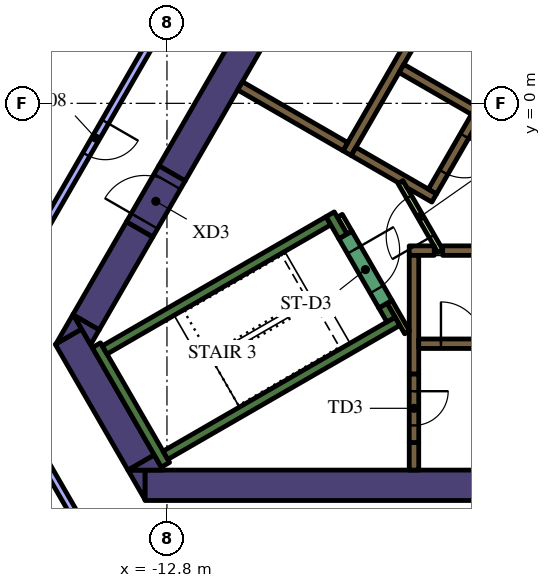
"""IFC4 building model, lengths in metres.
Left out: names, types, materials, properties, quantities, classifications, styles, units other than length and angle.
Written with IfcOpenShell. Run it as: python <this file> out.ifc"""

import sys

from ifc_helpers import new_model, si_unit, direction, frame, frame_2d, origin, place, context, subcontext, project, spatial, polyline, rectangle, outline, extrude, element, fill, save


model = new_model("IFC4")
c1 = context("Model", 3, precision=1e-05, world=origin(), true_north=direction((0.0, 1.0)))
c2 = subcontext(c1, "Body", "Model", "MODEL_VIEW")
j1 = project(units=[si_unit("LENGTHUNIT", "METRE"), si_unit("PLANEANGLEUNIT", "RADIAN")], contexts=[c1])
p1 = place(None, origin())
s1 = spatial("IfcSite", under=j1, at=p1, CompositionType="ELEMENT")
p2 = place(p1, origin())
s2 = spatial("IfcBuilding", under=s1, at=p2, CompositionType="ELEMENT")
p3 = place(p2, frame((0.0, 0.0, 183.6)))
s3 = spatial("IfcBuildingStorey", under=s2, at=p3, CompositionType="ELEMENT", Elevation=183.6)
p4 = place(p3, frame((-13.378, -10.05, 0.0), z_axis=(0.0, 0.0, 1.0), x_axis=(1.0, 0.0, 0.0)))
e1 = element("IfcWall", 1, at=p4, inside=s3, PredefinedType="SOLIDWALL", context=c2, shape_type="SweptSolid", body=[
    extrude(rectangle(XDim=22.282, YDim=0.8, at=frame_2d((11.141, 0.0))), origin(), (0.0, 0.0, 1.0), 4.2),
])
p5 = place(p3, origin())
e2 = element("IfcWall", 2, at=p5, inside=s3, PredefinedType="SOLIDWALL", context=c2, shape_type="SweptSolid", body=[
    extrude(outline(polyline([(-13.828, -9.65), (-13.38, -9.65), (-13.38, -10.426), (-13.828, -9.65)])), origin(), (0.0, 0.0, 1.0), 4.2),
])
p6 = place(p3, frame((-15.392, -6.14, 0.0), z_axis=(0.0, 0.0, 1.0), x_axis=(0.499984020225, -0.866034629516, 0.0)))
e3 = element("IfcWall", 3, at=p6, inside=s3, PredefinedType="SOLIDWALL", context=c2, shape_type="SweptSolid", body=[
    extrude(rectangle(XDim=3.824, YDim=0.8, at=frame_2d((1.912, 0.0))), origin(), (0.0, 0.0, 1.0), 4.2),
])
e4 = element("IfcWall", 4, at=p5, inside=s3, PredefinedType="SOLIDWALL", context=c2, shape_type="SweptSolid", body=[
    extrude(outline(polyline([(-15.047, -5.938), (-15.719, -6.326), (-15.271, -5.55), (-15.047, -5.938)])), origin(), (0.0, 0.0, 1.0), 4.2),
])
e5 = element("IfcWall", 5, at=p5, inside=s3, PredefinedType="SOLIDWALL", context=c2, shape_type="SweptSolid", body=[
    extrude(outline(polyline([(-12.904, -9.65), (-13.82, -9.65), (-13.133, -9.253), (-12.904, -9.65)])), origin(), (0.0, 0.0, 1.0), 4.2),
])
p7 = place(p3, frame((-13.518, -3.314, 0.0), z_axis=(0.0, 0.0, 1.0), x_axis=(-0.499969377405, -0.866043083026, 0.0)))
e6 = element("IfcWall", 6, at=p7, inside=s3, PredefinedType="SOLIDWALL", context=c2, shape_type="SweptSolid", body=[
    extrude(rectangle(XDim=2.824, YDim=0.8, at=frame_2d((1.412, 0.0))), origin(), (0.0, 0.0, 1.0), 4.2),
])
e7 = element("IfcWall", 7, at=p5, inside=s3, PredefinedType="SOLIDWALL", context=c2, shape_type="SweptSolid", body=[
    extrude(outline(polyline([(-14.809, -6.35), (-15.257, -5.574), (-14.585, -5.962), (-14.809, -6.35)])), origin(), (0.0, 0.0, 1.0), 4.2),
])
p8 = place(p3, frame((-12.668, -1.842, 0.0), z_axis=(0.0, 0.0, 1.0), x_axis=(0.500003640647, 0.866023301845, 0.0)))
e8 = element("IfcWall", 8, at=p8, inside=s3, PredefinedType="SOLIDWALL", context=c2, shape_type="SweptSolid", body=[
    extrude(rectangle(XDim=15.858, YDim=0.8, at=frame_2d((7.929, 0.0))), origin(), (0.0, 0.0, 1.0), 4.2),
])
p9 = place(p3, frame((-12.84, -9.511, 0.0), z_axis=(0.0, 0.0, 1.0), x_axis=(-0.499997733992, 0.866026712061, 0.0)))
e9 = element("IfcWall", 9, at=p9, inside=s3, PredefinedType="SOLIDWALL", context=c2, shape_type="SweptSolid", body=[
    extrude(rectangle(XDim=3.634, YDim=0.25, at=frame_2d((1.817, 0.0))), origin(), (0.0, 0.0, 1.0), 4.2),
])
p10 = place(p3, frame((-14.44, -6.49, 0.0), z_axis=(0.0, 0.0, 1.0), x_axis=(0.866022966069, 0.500004222222, 0.0)))
e10 = element("IfcWall", 10, at=p10, inside=s3, PredefinedType="SOLIDWALL", context=c2, shape_type="SweptSolid", body=[
    extrude(rectangle(XDim=6.8, YDim=0.25, at=frame_2d((3.4, 0.0))), origin(), (0.0, 0.0, 1.0), 4.2),
])
p11 = place(p3, frame((-8.168, -3.503, 0.0), z_axis=(0.0, 0.0, 1.0), x_axis=(-0.499952099219, 0.866053057547, 0.0)))
e11 = element("IfcWall", 11, at=p11, inside=s3, PredefinedType="SOLIDWALL", context=c2, shape_type="SweptSolid", body=[
    extrude(rectangle(XDim=0.675, YDim=0.25, at=frame_2d((0.337, 0.0))), origin(), (0.0, 0.0, 1.0), 4.2),
])
p12 = place(p3, frame((-12.84, -9.261, 0.0), z_axis=(0.0, 0.0, 1.0), x_axis=(0.866016039709, 0.500016218704, 0.0)))
e12 = element("IfcWall", 12, at=p12, inside=s3, PredefinedType="SOLIDWALL", context=c2, shape_type="SweptSolid", body=[
    extrude(rectangle(XDim=7.05, YDim=0.25, at=frame_2d((3.525, 0.0))), origin(), (0.0, 0.0, 1.0), 4.2),
])
p13 = place(p3, frame((-6.905, -5.69, 0.0), z_axis=(0.0, 0.0, 1.0), x_axis=(-0.500402024738, 0.865793170242, 0.0)))
e13 = element("IfcWall", 13, at=p13, inside=s3, PredefinedType="SOLIDWALL", context=c2, shape_type="SweptSolid", body=[
    extrude(rectangle(XDim=0.425, YDim=0.25, at=frame_2d((0.212, 0.0))), origin(), (0.0, 0.0, 1.0), 4.2),
])
p14 = place(p3, frame((-6.3, -8.925, 0.0), z_axis=(0.0, 0.0, 1.0), x_axis=(0.0, -1.0, 0.0)))
e14 = element("IfcWall", 14, at=p14, inside=s3, PredefinedType="SOLIDWALL", context=c2, shape_type="SweptSolid", body=[
    extrude(rectangle(XDim=0.725, YDim=0.25, at=frame_2d((0.363, 0.0))), origin(), (0.0, 0.0, 1.0), 4.2),
])
p15 = place(p3, frame((-5.545, -3.875, 0.0), z_axis=(0.0, 0.0, 1.0), x_axis=(1.0, 0.0, 0.0)))
e15 = element("IfcWall", 15, at=p15, inside=s3, PredefinedType="SOLIDWALL", context=c2, shape_type="SweptSolid", body=[
    extrude(rectangle(XDim=11.97, YDim=0.25, at=frame_2d((5.985, 0.0))), origin(), (0.0, 0.0, 1.0), 4.2),
])
p16 = place(p3, frame((-6.425, -3.875, 0.0), z_axis=(0.0, 0.0, 1.0), x_axis=(1.0, 0.0, 0.0)))
e16 = element("IfcWall", 16, at=p16, inside=s3, PredefinedType="SOLIDWALL", context=c2, shape_type="SweptSolid", body=[
    extrude(rectangle(XDim=0.658, YDim=0.25, at=frame_2d((0.329, 0.0))), origin(), (0.0, 0.0, 1.0), 4.2),
])
p17 = place(p3, frame((-6.3, -7.125, 0.0), z_axis=(0.0, 0.0, 1.0), x_axis=(0.0, 1.0, 0.0)))
e17 = element("IfcWall", 17, at=p17, inside=s3, PredefinedType="SOLIDWALL", context=c2, shape_type="SweptSolid", body=[
    extrude(rectangle(XDim=3.125, YDim=0.25, at=frame_2d((1.562, 0.0))), origin(), (0.0, 0.0, 1.0), 4.2),
])
p18 = place(p3, frame((-8.06, -1.311, 0.0), z_axis=(0.0, 0.0, 1.0), x_axis=(0.50000273126, 0.866023826885, 0.0)))
e18 = element("IfcWall", 18, at=p18, inside=s3, PredefinedType="SOLIDWALL", context=c2, shape_type="SweptSolid", body=[
    extrude(rectangle(XDim=10.33, YDim=0.25, at=frame_2d((5.165, 0.0))), origin(), (0.0, 0.0, 1.0), 4.2),
])
p19 = place(p3, frame((-4.724, -0.182, 0.0), z_axis=(0.0, 0.0, 1.0), x_axis=(-0.866008176907, 0.50002983664, 0.0)))
e19 = element("IfcWall", 19, at=p19, inside=s3, PredefinedType="SOLIDWALL", context=c2, shape_type="SweptSolid", body=[
    extrude(rectangle(XDim=2.2, YDim=0.25, at=frame_2d((1.1, 0.0))), origin(), (0.0, 0.0, 1.0), 4.2),
])
e20 = element("IfcWall", 20, at=p5, inside=s3, PredefinedType="SOLIDWALL", context=c2, shape_type="SweptSolid", body=[
    extrude(outline(polyline([(-5.922, -2.257), (-5.922, -2.257), (-5.705, -2.382), (-5.83, -2.598), (-6.483, -2.221), (-6.591, -2.033), (-6.591, -2.033), (-6.7, -2.096), (-7.952, -1.373), (-7.827, -1.156), (-5.922, -2.257)])), origin(), (0.0, 0.0, 1.0), 4.2),
])
p20 = place(p3, frame((-8.106, -1.14, 0.0), z_axis=(0.0, 0.0, 1.0), x_axis=(-0.866008981251, 0.500028443584, 0.0)))
e21 = element("IfcWall", 21, at=p20, inside=s3, PredefinedType="SOLIDWALL", context=c2, shape_type="SweptSolid", body=[
    extrude(rectangle(XDim=3.2, YDim=0.25, at=frame_2d((1.6, 0.0))), origin(), (0.0, 0.0, 1.0), 4.2),
])
p21 = place(p3, frame((-8.252, -2.958, 0.0), z_axis=(0.0, 0.0, 1.0), x_axis=(0.500174715838, -0.865924508047, 0.0)))
e22 = element("IfcWall", 22, at=p21, inside=s3, PredefinedType="PARTITIONING", context=c2, shape_type="SweptSolid", body=[
    extrude(rectangle(XDim=0.514, YDim=0.15, at=frame_2d((0.257, 0.0))), origin(), (0.0, 0.0, 1.0), 3.15),
])
p22 = place(p3, frame((-6.48, -6.027, 0.0), z_axis=(0.0, 0.0, 1.0), x_axis=(-0.499927229454, 0.866067413802, 0.0)))
e23 = element("IfcWall", 23, at=p22, inside=s3, PredefinedType="PARTITIONING", context=c2, shape_type="SweptSolid", body=[
    extrude(rectangle(XDim=0.929, YDim=0.15, at=frame_2d((0.464, 0.0))), origin(), (0.0, 0.0, 1.0), 4.2),
])
p23 = place(p3, frame((-6.175, -6.325, 0.0), z_axis=(0.0, 0.0, 1.0), x_axis=(1.0, 0.0, 0.0)))
e24 = element("IfcWall", 24, at=p23, inside=s3, PredefinedType="SOLIDWALL", context=c2, shape_type="SweptSolid", body=[
    extrude(rectangle(XDim=12.35, YDim=0.25, at=frame_2d((6.175, 0.0))), origin(), (0.0, 0.0, 1.0), 4.2),
])
p24 = place(p23, frame((0.585, 0.0, 0.0)))
e25 = element("IfcOpeningElement", 25, at=p24, cuts=e24, PredefinedType="OPENING", context=c2, shape_type="SweptSolid", body=[
    extrude(rectangle(XDim=1.1, YDim=2.1, at=frame_2d((0.55, 1.05))), frame((0.0, 0.135, 0.0), z_axis=(0.0, -1.0, 0.0), x_axis=(1.0, 0.0, 0.0)), (0.0, 0.0, 1.0), 0.27),
])
p25 = place(p23, frame((3.105, 0.0, 0.0)))
e26 = element("IfcOpeningElement", 26, at=p25, cuts=e24, PredefinedType="OPENING", context=c2, shape_type="SweptSolid", body=[
    extrude(rectangle(XDim=1.1, YDim=2.1, at=frame_2d((0.55, 1.05))), frame((0.0, 0.135, 0.0), z_axis=(0.0, -1.0, 0.0), x_axis=(1.0, 0.0, 0.0)), (0.0, 0.0, 1.0), 0.27),
])
p26 = place(p23, frame((5.625, 0.0, 0.0)))
e27 = element("IfcOpeningElement", 27, at=p26, cuts=e24, PredefinedType="OPENING", context=c2, shape_type="SweptSolid", body=[
    extrude(rectangle(XDim=1.1, YDim=2.1, at=frame_2d((0.55, 1.05))), frame((0.0, 0.135, 0.0), z_axis=(0.0, -1.0, 0.0), x_axis=(1.0, 0.0, 0.0)), (0.0, 0.0, 1.0), 0.27),
])
p27 = place(p23, frame((8.145, 0.0, 0.0)))
e28 = element("IfcOpeningElement", 28, at=p27, cuts=e24, PredefinedType="OPENING", context=c2, shape_type="SweptSolid", body=[
    extrude(rectangle(XDim=1.1, YDim=2.1, at=frame_2d((0.55, 1.05))), frame((0.0, 0.135, 0.0), z_axis=(0.0, -1.0, 0.0), x_axis=(1.0, 0.0, 0.0)), (0.0, 0.0, 1.0), 0.27),
])
p28 = place(p23, frame((10.665, 0.0, 0.0)))
e29 = element("IfcOpeningElement", 29, at=p28, cuts=e24, PredefinedType="OPENING", context=c2, shape_type="SweptSolid", body=[
    extrude(rectangle(XDim=1.1, YDim=2.1, at=frame_2d((0.55, 1.05))), frame((0.0, 0.135, 0.0), z_axis=(0.0, -1.0, 0.0), x_axis=(1.0, 0.0, 0.0)), (0.0, 0.0, 1.0), 0.27),
])
p29 = place(p3, frame((-0.898, 6.194, 0.0), z_axis=(0.0, 0.0, 1.0), x_axis=(-0.499996202215, -0.866027596426, 0.0)))
e30 = element("IfcWall", 30, at=p29, inside=s3, PredefinedType="SOLIDWALL", context=c2, shape_type="SweptSolid", body=[
    extrude(rectangle(XDim=9.83, YDim=0.25, at=frame_2d((4.915, 0.0))), origin(), (0.0, 0.0, 1.0), 4.2),
])
p30 = place(p29, frame((0.585, 0.0, 0.0)))
e31 = element("IfcOpeningElement", 31, at=p30, cuts=e30, PredefinedType="OPENING", context=c2, shape_type="SweptSolid", body=[
    extrude(rectangle(XDim=1.1, YDim=2.1, at=frame_2d((0.55, 1.05))), frame((0.0, 0.135, 0.0), z_axis=(0.0, -1.0, 0.0), x_axis=(1.0, 0.0, 0.0)), (0.0, 0.0, 1.0), 0.27),
])
p31 = place(p29, frame((3.105, 0.0, 0.0)))
e32 = element("IfcOpeningElement", 32, at=p31, cuts=e30, PredefinedType="OPENING", context=c2, shape_type="SweptSolid", body=[
    extrude(rectangle(XDim=1.1, YDim=2.1, at=frame_2d((0.55, 1.05))), frame((0.0, 0.135, 0.0), z_axis=(0.0, -1.0, 0.0), x_axis=(1.0, 0.0, 0.0)), (0.0, 0.0, 1.0), 0.27),
])
p32 = place(p29, frame((5.625, 0.0, 0.0)))
e33 = element("IfcOpeningElement", 33, at=p32, cuts=e30, PredefinedType="OPENING", context=c2, shape_type="SweptSolid", body=[
    extrude(rectangle(XDim=1.1, YDim=2.1, at=frame_2d((0.55, 1.05))), frame((0.0, 0.135, 0.0), z_axis=(0.0, -1.0, 0.0), x_axis=(1.0, 0.0, 0.0)), (0.0, 0.0, 1.0), 0.27),
])
p33 = place(p29, frame((8.145, 0.0, 0.0)))
e34 = element("IfcOpeningElement", 34, at=p33, cuts=e30, PredefinedType="OPENING", context=c2, shape_type="SweptSolid", body=[
    extrude(rectangle(XDim=1.1, YDim=2.1, at=frame_2d((0.55, 1.05))), frame((0.0, 0.135, 0.0), z_axis=(0.0, -1.0, 0.0), x_axis=(1.0, 0.0, 0.0)), (0.0, 0.0, 1.0), 0.27),
])
p34 = place(p3, frame((-8.103, -3.466, 0.0), z_axis=(0.0, 0.0, 1.0), x_axis=(0.500078061341, -0.865980330357, 0.0)))
e35 = element("IfcWall", 35, at=p34, inside=s3, PredefinedType="SOLIDWALL", context=c2, shape_type="SweptSolid", body=[
    extrude(rectangle(XDim=2.1, YDim=0.4, at=frame_2d((1.05, 0.0))), origin(), (0.0, 0.0, 1.0), 4.2),
])
p35 = place(p34, frame((0.45, 0.0, 0.0)))
e36 = element("IfcOpeningElement", 36, at=p35, cuts=e35, PredefinedType="OPENING", context=c2, shape_type="SweptSolid", body=[
    extrude(rectangle(XDim=1.2, YDim=2.1, at=frame_2d((0.6, 1.05))), frame((0.0, 0.21, 0.0), z_axis=(0.0, -1.0, 0.0), x_axis=(1.0, 0.0, 0.0)), (0.0, 0.0, 1.0), 0.42),
])
p36 = place(p3, frame((-6.3, -7.125, 0.0), z_axis=(0.0, 0.0, 1.0), x_axis=(0.0, -1.0, 0.0)))
e37 = element("IfcWall", 37, at=p36, inside=s3, PredefinedType="SOLIDWALL", context=c2, shape_type="SweptSolid", body=[
    extrude(rectangle(XDim=1.8, YDim=0.25, at=frame_2d((0.9, 0.0))), origin(), (0.0, 0.0, 1.0), 4.2),
])
p37 = place(p36, frame((0.45, 0.0, 0.0)))
e38 = element("IfcOpeningElement", 38, at=p37, cuts=e37, PredefinedType="OPENING", context=c2, shape_type="SweptSolid", body=[
    extrude(rectangle(XDim=0.9, YDim=2.1, at=frame_2d((0.45, 1.05))), frame((0.0, 0.135, 0.0), z_axis=(0.0, -1.0, 0.0), x_axis=(1.0, 0.0, 0.0)), (0.0, 0.0, 1.0), 0.27),
])
p38 = place(p3, frame((-5.606, -3.89, 0.0), z_axis=(0.0, 0.0, 1.0), x_axis=(-0.500027713859, 0.866009402589, 0.0)))
e39 = element("IfcWall", 39, at=p38, inside=s3, PredefinedType="PARTITIONING", context=c2, shape_type="SweptSolid", body=[
    extrude(rectangle(XDim=2.1, YDim=0.15, at=frame_2d((1.05, 0.0))), origin(), (0.0, 0.0, 1.0), 3.15),
])
p39 = place(p38, frame((0.45, 0.0, 0.0)))
e40 = element("IfcOpeningElement", 40, at=p39, cuts=e39, PredefinedType="OPENING", context=c2, shape_type="SweptSolid", body=[
    extrude(rectangle(XDim=1.2, YDim=2.1, at=frame_2d((0.6, 1.05))), frame((0.0, 0.085, 0.0), z_axis=(0.0, -1.0, 0.0), x_axis=(1.0, 0.0, 0.0)), (0.0, 0.0, 1.0), 0.17),
])
p40 = place(p3, frame((-13.518, -3.314, 0.0), z_axis=(0.0, 0.0, 1.0), x_axis=(0.500000056704, 0.866025371046, 0.0)))
e41 = element("IfcWall", 41, at=p40, inside=s3, PredefinedType="SOLIDWALL", context=c2, shape_type="SweptSolid", body=[
    extrude(rectangle(XDim=1.7, YDim=0.8, at=frame_2d((0.85, 0.0))), origin(), (0.0, 0.0, 1.0), 4.2),
])
p41 = place(p40, frame((0.25, 0.0, 0.0)))
e42 = element("IfcOpeningElement", 42, at=p41, cuts=e41, PredefinedType="OPENING", context=c2, shape_type="SweptSolid", body=[
    extrude(rectangle(XDim=1.2, YDim=2.1, at=frame_2d((0.6, 1.05))), frame((0.0, 0.41, 0.0), z_axis=(0.0, -1.0, 0.0), x_axis=(1.0, 0.0, 0.0)), (0.0, 0.0, 1.0), 0.82),
])
p42 = place(p3, frame((-12.374, 3.068, 0.0), z_axis=(0.0, 0.0, 1.0), x_axis=(-0.50000000053, -0.866025403479, 0.0)))
e43 = element("IfcWall", 43, at=p42, inside=s3, PredefinedType="PARTITIONING", context=c2, shape_type="SweptSolid", body=[
    extrude(rectangle(XDim=9.188, YDim=0.2, at=frame_2d((4.594, 0.0))), origin(), (0.0, 0.0, 1.0), 3.15),
])
p43 = place(p42, frame((4.1, 0.0, 0.0)))
e44 = element("IfcOpeningElement", 44, at=p43, cuts=e43, PredefinedType="OPENING", context=c2, shape_type="SweptSolid", body=[
    extrude(rectangle(XDim=1.0, YDim=2.1, at=frame_2d((0.5, 1.05))), frame((0.0, 0.11, 0.0), z_axis=(0.0, -1.0, 0.0), x_axis=(1.0, 0.0, 0.0)), (0.0, 0.0, 1.0), 0.22),
])
p44 = place(p3, frame((-16.058, -9.387, 0.0), z_axis=(0.0, 0.0, 1.0), x_axis=(0.500046299512, -0.865998671098, 0.0)))
e45 = element("IfcWall", 45, at=p44, inside=s3, PredefinedType="PARTITIONING", context=c2, shape_type="SweptSolid", body=[
    extrude(rectangle(XDim=3.306, YDim=0.2, at=frame_2d((1.653, 0.0))), origin(), (0.0, 0.0, 1.0), 3.15),
])
p45 = place(p24, origin())
e46 = element("IfcDoor", 46, at=p45, inside=s3, OperationType="DOUBLE_DOOR_SLIDING", PredefinedType="DOOR", context=c2, shape_type="SweptSolid", body=[
    extrude(rectangle(XDim=1.1, YDim=2.1, at=frame_2d((0.55, 1.05))), frame((0.0, 0.025, 0.0), z_axis=(0.0, -1.0, 0.0), x_axis=(1.0, 0.0, 0.0)), (0.0, 0.0, 1.0), 0.05),
])
fill(e25, e46)
p46 = place(p33, origin())
e47 = element("IfcDoor", 47, at=p46, inside=s3, OperationType="DOUBLE_DOOR_SLIDING", PredefinedType="DOOR", context=c2, shape_type="SweptSolid", body=[
    extrude(rectangle(XDim=1.1, YDim=2.1, at=frame_2d((0.55, 1.05))), frame((0.0, 0.025, 0.0), z_axis=(0.0, -1.0, 0.0), x_axis=(1.0, 0.0, 0.0)), (0.0, 0.0, 1.0), 0.05),
])
fill(e34, e47)
p47 = place(p35, origin())
e48 = element("IfcDoor", 48, at=p47, inside=s3, OperationType="SINGLE_SWING_LEFT", PredefinedType="DOOR", context=c2, shape_type="SweptSolid", body=[
    extrude(rectangle(XDim=1.2, YDim=2.1, at=frame_2d((0.6, 1.05))), frame((0.0, 0.025, 0.0), z_axis=(0.0, -1.0, 0.0), x_axis=(1.0, 0.0, 0.0)), (0.0, 0.0, 1.0), 0.05),
])
fill(e36, e48)
p48 = place(p37, origin())
e49 = element("IfcDoor", 49, at=p48, inside=s3, OperationType="SINGLE_SWING_LEFT", PredefinedType="DOOR", context=c2, shape_type="SweptSolid", body=[
    extrude(rectangle(XDim=0.9, YDim=2.1, at=frame_2d((0.45, 1.05))), frame((0.0, 0.025, 0.0), z_axis=(0.0, -1.0, 0.0), x_axis=(1.0, 0.0, 0.0)), (0.0, 0.0, 1.0), 0.05),
])
fill(e38, e49)
p49 = place(p39, origin())
e50 = element("IfcDoor", 50, at=p49, inside=s3, OperationType="SINGLE_SWING_LEFT", PredefinedType="DOOR", context=c2, shape_type="SweptSolid", body=[
    extrude(rectangle(XDim=1.2, YDim=2.1, at=frame_2d((0.6, 1.05))), frame((0.0, 0.025, 0.0), z_axis=(0.0, -1.0, 0.0), x_axis=(1.0, 0.0, 0.0)), (0.0, 0.0, 1.0), 0.05),
])
fill(e40, e50)
p50 = place(p41, origin())
e51 = element("IfcDoor", 51, at=p50, inside=s3, OperationType="SINGLE_SWING_LEFT", PredefinedType="DOOR", context=c2, shape_type="SweptSolid", body=[
    extrude(rectangle(XDim=1.2, YDim=2.1, at=frame_2d((0.6, 1.05))), frame((0.0, 0.025, 0.0), z_axis=(0.0, -1.0, 0.0), x_axis=(1.0, 0.0, 0.0)), (0.0, 0.0, 1.0), 0.05),
])
fill(e42, e51)
p51 = place(p43, origin())
e52 = element("IfcDoor", 52, at=p51, inside=s3, OperationType="SINGLE_SWING_RIGHT", PredefinedType="DOOR", context=c2, shape_type="SweptSolid", body=[
    extrude(rectangle(XDim=1.0, YDim=2.1, at=frame_2d((0.5, 1.05))), frame((0.0, 0.025, 0.0), z_axis=(0.0, -1.0, 0.0), x_axis=(1.0, 0.0, 0.0)), (0.0, 0.0, 1.0), 0.05),
])
fill(e44, e52)
save(model, sys.argv[1])
